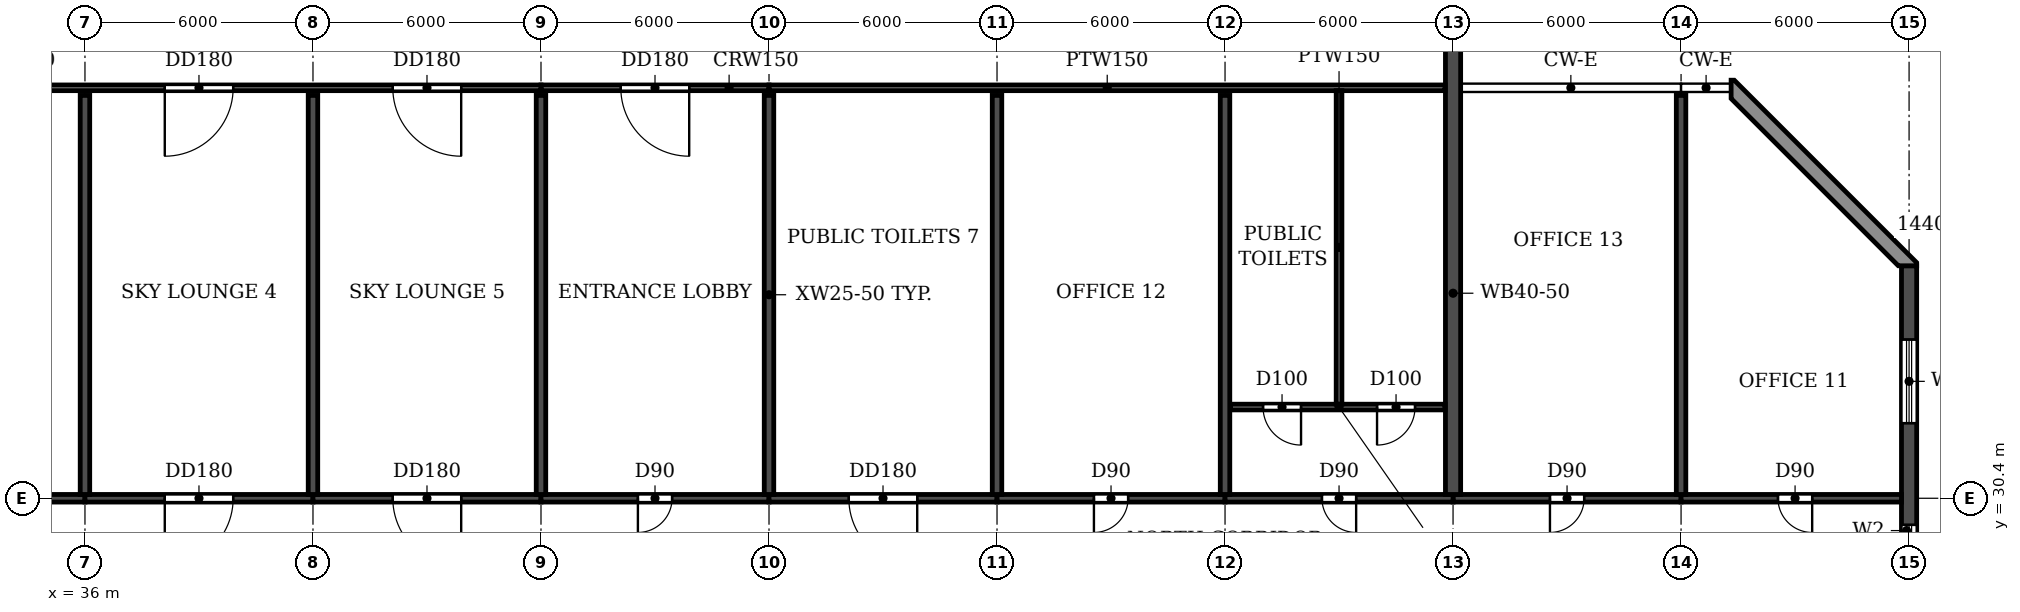
"""IFC4 building model, lengths in metres.
Left out: names, types, materials, properties, quantities, classifications, styles, units other than length and angle.
Written with IfcOpenShell. Run it as: python <this file> out.ifc"""

import sys

from ifc_helpers import new_model, si_unit, direction, frame, frame_2d, origin, place, context, subcontext, project, spatial, polyline, rectangle, outline, extrude, element, fill, save


model = new_model("IFC4")
c1 = context("Model", 3, precision=1e-05, world=origin(), true_north=direction((0.0, 1.0)))
c2 = subcontext(c1, "Body", "Model", "MODEL_VIEW")
j1 = project(units=[si_unit("LENGTHUNIT", "METRE"), si_unit("PLANEANGLEUNIT", "RADIAN")], contexts=[c1])
p1 = place(None, origin())
s1 = spatial("IfcSite", under=j1, at=p1, CompositionType="ELEMENT")
p2 = place(p1, origin())
s2 = spatial("IfcBuilding", under=s1, at=p2, CompositionType="ELEMENT")
p3 = place(p2, frame((0.0, 0.0, 261.0)))
s3 = spatial("IfcBuildingStorey", under=s2, at=p3, CompositionType="ELEMENT", Elevation=261.0)
for number, where, z_axis, x_axis in (
    (1, (36.0, 30.5, 0.0), (0.0, 0.0, 1.0), (0.0, 1.0, 0.0)),
    (2, (42.0, 30.5, 0.0), (0.0, 0.0, 1.0), (0.0, 1.0, 0.0)),
    (3, (48.0, 30.5, 0.0), (0.0, 0.0, 1.0), (0.0, 1.0, 0.0)),
    (4, (54.0, 30.5, 0.0), (0.0, 0.0, 1.0), (0.0, 1.0, 0.0)),
    (5, (60.0, 30.5, 0.0), (0.0, 0.0, 1.0), (0.0, 1.0, 0.0)),
    (6, (66.0, 30.5, 0.0), (0.0, 0.0, 1.0), (0.0, 1.0, 0.0)),
    (7, (78.0, 30.5, 0.0), (0.0, 0.0, 1.0), (0.0, 1.0, 0.0)),
):
    element("IfcWall", number, at=place(p3, frame(where, z_axis=z_axis, x_axis=x_axis)), inside=s3, PredefinedType="SHEAR", context=c2, shape_type="SweptSolid", body=[
        extrude(rectangle(XDim=10.5, YDim=0.25, at=frame_2d((5.25, 0.0))), origin(), (0.0, 0.0, 1.0), 5.7),
    ])
p4 = place(p3, frame((84.0, 4.683, 0.0), z_axis=(0.0, 0.0, 1.0), x_axis=(0.0, 1.0, 0.0)))
e8 = element("IfcWall", 8, at=p4, inside=s3, PredefinedType="SHEAR", context=c2, shape_type="SweptSolid", body=[
    extrude(rectangle(XDim=31.834, YDim=0.4, at=frame_2d((15.917, 0.0))), origin(), (0.0, 0.0, 1.0), 5.7),
])
p5 = place(p4, frame((23.817, 0.0, 0.9)))
e9 = element("IfcOpeningElement", 9, at=p5, cuts=e8, PredefinedType="OPENING", context=c2, shape_type="SweptSolid", body=[
    extrude(rectangle(XDim=1.2, YDim=1.5, at=frame_2d((0.6, 0.75))), frame((0.0, 0.21, 0.0), z_axis=(0.0, -1.0, 0.0), x_axis=(1.0, 0.0, 0.0)), (0.0, 0.0, 1.0), 0.42),
])
p6 = place(p4, frame((8.017, 0.0, 0.9)))
e10 = element("IfcOpeningElement", 10, at=p6, cuts=e8, PredefinedType="OPENING", context=c2, shape_type="SweptSolid", body=[
    extrude(rectangle(XDim=1.2, YDim=1.5, at=frame_2d((0.6, 0.75))), frame((0.0, 0.21, 0.0), z_axis=(0.0, -1.0, 0.0), x_axis=(1.0, 0.0, 0.0)), (0.0, 0.0, 1.0), 0.42),
])
p7 = place(p4, frame((27.694, 0.0, 0.6)))
e11 = element("IfcOpeningElement", 11, at=p7, cuts=e8, PredefinedType="OPENING", context=c2, shape_type="SweptSolid", body=[
    extrude(rectangle(XDim=2.2, YDim=1.8, at=frame_2d((1.1, 0.9))), frame((0.0, 0.21, 0.0), z_axis=(0.0, -1.0, 0.0), x_axis=(1.0, 0.0, 0.0)), (0.0, 0.0, 1.0), 0.42),
])
p8 = place(p4, frame((2.541, 0.0, 0.6)))
e12 = element("IfcOpeningElement", 12, at=p8, cuts=e8, PredefinedType="OPENING", context=c2, shape_type="SweptSolid", body=[
    extrude(rectangle(XDim=2.2, YDim=1.8, at=frame_2d((1.1, 0.9))), frame((0.0, 0.21, 0.0), z_axis=(0.0, -1.0, 0.0), x_axis=(1.0, 0.0, 0.0)), (0.0, 0.0, 1.0), 0.42),
])
p9 = place(p4, frame((15.917, 0.0, 0.9)))
e13 = element("IfcOpeningElement", 13, at=p9, cuts=e8, PredefinedType="OPENING", context=c2, shape_type="SweptSolid", body=[
    extrude(rectangle(XDim=1.2, YDim=1.5, at=frame_2d((0.6, 0.75))), frame((0.0, 0.21, 0.0), z_axis=(0.0, -1.0, 0.0), x_axis=(1.0, 0.0, 0.0)), (0.0, 0.0, 1.0), 0.42),
])
p10 = place(p3, frame((30.0, 30.4, 0.0), z_axis=(0.0, 0.0, 1.0), x_axis=(1.0, 0.0, 0.0)))
e14 = element("IfcWall", 14, at=p10, inside=s3, PredefinedType="SHEAR", context=c2, shape_type="SweptSolid", body=[
    extrude(rectangle(XDim=6.0, YDim=0.2, at=frame_2d((3.0, 0.0))), origin(), (0.0, 0.0, 1.0), 5.1),
])
p11 = place(p10, frame((2.55, 0.0, 0.0)))
e15 = element("IfcOpeningElement", 15, at=p11, cuts=e14, PredefinedType="OPENING", context=c2, shape_type="SweptSolid", body=[
    extrude(rectangle(XDim=0.9, YDim=2.1, at=frame_2d((0.45, 1.05))), frame((0.0, 0.11, 0.0), z_axis=(0.0, -1.0, 0.0), x_axis=(1.0, 0.0, 0.0)), (0.0, 0.0, 1.0), 0.22),
])
p12 = place(p3, frame((36.0, 30.4, 0.0), z_axis=(0.0, 0.0, 1.0), x_axis=(1.0, 0.0, 0.0)))
e16 = element("IfcWall", 16, at=p12, inside=s3, PredefinedType="SHEAR", context=c2, shape_type="SweptSolid", body=[
    extrude(rectangle(XDim=6.0, YDim=0.2, at=frame_2d((3.0, 0.0))), origin(), (0.0, 0.0, 1.0), 5.1),
])
p13 = place(p12, frame((2.1, 0.0, 0.0)))
e17 = element("IfcOpeningElement", 17, at=p13, cuts=e16, PredefinedType="OPENING", context=c2, shape_type="SweptSolid", body=[
    extrude(rectangle(XDim=1.8, YDim=2.1, at=frame_2d((0.9, 1.05))), frame((0.0, 0.11, 0.0), z_axis=(0.0, -1.0, 0.0), x_axis=(1.0, 0.0, 0.0)), (0.0, 0.0, 1.0), 0.22),
])
p14 = place(p3, frame((42.0, 30.4, 0.0), z_axis=(0.0, 0.0, 1.0), x_axis=(1.0, 0.0, 0.0)))
e18 = element("IfcWall", 18, at=p14, inside=s3, PredefinedType="SHEAR", context=c2, shape_type="SweptSolid", body=[
    extrude(rectangle(XDim=6.0, YDim=0.2, at=frame_2d((3.0, 0.0))), origin(), (0.0, 0.0, 1.0), 5.1),
])
p15 = place(p14, frame((2.1, 0.0, 0.0)))
e19 = element("IfcOpeningElement", 19, at=p15, cuts=e18, PredefinedType="OPENING", context=c2, shape_type="SweptSolid", body=[
    extrude(rectangle(XDim=1.8, YDim=2.1, at=frame_2d((0.9, 1.05))), frame((0.0, 0.11, 0.0), z_axis=(0.0, -1.0, 0.0), x_axis=(1.0, 0.0, 0.0)), (0.0, 0.0, 1.0), 0.22),
])
p16 = place(p3, frame((48.0, 30.4, 0.0), z_axis=(0.0, 0.0, 1.0), x_axis=(1.0, 0.0, 0.0)))
e20 = element("IfcWall", 20, at=p16, inside=s3, PredefinedType="SHEAR", context=c2, shape_type="SweptSolid", body=[
    extrude(rectangle(XDim=6.0, YDim=0.2, at=frame_2d((3.0, 0.0))), origin(), (0.0, 0.0, 1.0), 5.1),
])
p17 = place(p16, frame((2.55, 0.0, 0.0)))
e21 = element("IfcOpeningElement", 21, at=p17, cuts=e20, PredefinedType="OPENING", context=c2, shape_type="SweptSolid", body=[
    extrude(rectangle(XDim=0.9, YDim=2.1, at=frame_2d((0.45, 1.05))), frame((0.0, 0.11, 0.0), z_axis=(0.0, -1.0, 0.0), x_axis=(1.0, 0.0, 0.0)), (0.0, 0.0, 1.0), 0.22),
])
p18 = place(p3, frame((54.0, 30.4, 0.0), z_axis=(0.0, 0.0, 1.0), x_axis=(1.0, 0.0, 0.0)))
e22 = element("IfcWall", 22, at=p18, inside=s3, PredefinedType="SHEAR", context=c2, shape_type="SweptSolid", body=[
    extrude(rectangle(XDim=6.0, YDim=0.2, at=frame_2d((3.0, 0.0))), origin(), (0.0, 0.0, 1.0), 5.1),
])
p19 = place(p18, frame((2.1, 0.0, 0.0)))
e23 = element("IfcOpeningElement", 23, at=p19, cuts=e22, PredefinedType="OPENING", context=c2, shape_type="SweptSolid", body=[
    extrude(rectangle(XDim=1.8, YDim=2.1, at=frame_2d((0.9, 1.05))), frame((0.0, 0.11, 0.0), z_axis=(0.0, -1.0, 0.0), x_axis=(1.0, 0.0, 0.0)), (0.0, 0.0, 1.0), 0.22),
])
p20 = place(p3, frame((60.0, 30.4, 0.0), z_axis=(0.0, 0.0, 1.0), x_axis=(1.0, 0.0, 0.0)))
e24 = element("IfcWall", 24, at=p20, inside=s3, PredefinedType="SHEAR", context=c2, shape_type="SweptSolid", body=[
    extrude(rectangle(XDim=6.0, YDim=0.2, at=frame_2d((3.0, 0.0))), origin(), (0.0, 0.0, 1.0), 5.1),
])
p21 = place(p20, frame((2.55, 0.0, 0.0)))
e25 = element("IfcOpeningElement", 25, at=p21, cuts=e24, PredefinedType="OPENING", context=c2, shape_type="SweptSolid", body=[
    extrude(rectangle(XDim=0.9, YDim=2.1, at=frame_2d((0.45, 1.05))), frame((0.0, 0.11, 0.0), z_axis=(0.0, -1.0, 0.0), x_axis=(1.0, 0.0, 0.0)), (0.0, 0.0, 1.0), 0.22),
])
p22 = place(p3, frame((66.0, 30.4, 0.0), z_axis=(0.0, 0.0, 1.0), x_axis=(1.0, 0.0, 0.0)))
e26 = element("IfcWall", 26, at=p22, inside=s3, PredefinedType="SHEAR", context=c2, shape_type="SweptSolid", body=[
    extrude(rectangle(XDim=6.0, YDim=0.2, at=frame_2d((3.0, 0.0))), origin(), (0.0, 0.0, 1.0), 5.1),
])
p23 = place(p22, frame((2.55, 0.0, 0.0)))
e27 = element("IfcOpeningElement", 27, at=p23, cuts=e26, PredefinedType="OPENING", context=c2, shape_type="SweptSolid", body=[
    extrude(rectangle(XDim=0.9, YDim=2.1, at=frame_2d((0.45, 1.05))), frame((0.0, 0.11, 0.0), z_axis=(0.0, -1.0, 0.0), x_axis=(1.0, 0.0, 0.0)), (0.0, 0.0, 1.0), 0.22),
])
p24 = place(p3, frame((72.0, 30.4, 0.0), z_axis=(0.0, 0.0, 1.0), x_axis=(1.0, 0.0, 0.0)))
e28 = element("IfcWall", 28, at=p24, inside=s3, PredefinedType="SHEAR", context=c2, shape_type="SweptSolid", body=[
    extrude(rectangle(XDim=6.0, YDim=0.2, at=frame_2d((3.0, 0.0))), origin(), (0.0, 0.0, 1.0), 5.1),
])
p25 = place(p24, frame((2.55, 0.0, 0.0)))
e29 = element("IfcOpeningElement", 29, at=p25, cuts=e28, PredefinedType="OPENING", context=c2, shape_type="SweptSolid", body=[
    extrude(rectangle(XDim=0.9, YDim=2.1, at=frame_2d((0.45, 1.05))), frame((0.0, 0.11, 0.0), z_axis=(0.0, -1.0, 0.0), x_axis=(1.0, 0.0, 0.0)), (0.0, 0.0, 1.0), 0.22),
])
p26 = place(p3, frame((78.0, 30.4, 0.0), z_axis=(0.0, 0.0, 1.0), x_axis=(1.0, 0.0, 0.0)))
e30 = element("IfcWall", 30, at=p26, inside=s3, PredefinedType="SHEAR", context=c2, shape_type="SweptSolid", body=[
    extrude(rectangle(XDim=5.8, YDim=0.2, at=frame_2d((2.9, 0.0))), origin(), (0.0, 0.0, 1.0), 5.1),
])
p27 = place(p26, frame((2.55, 0.0, 0.0)))
e31 = element("IfcOpeningElement", 31, at=p27, cuts=e30, PredefinedType="OPENING", context=c2, shape_type="SweptSolid", body=[
    extrude(rectangle(XDim=0.9, YDim=2.1, at=frame_2d((0.45, 1.05))), frame((0.0, 0.11, 0.0), z_axis=(0.0, -1.0, 0.0), x_axis=(1.0, 0.0, 0.0)), (0.0, 0.0, 1.0), 0.22),
])
p28 = place(p3, frame((72.0, 30.5, -1.2), z_axis=(0.0, 0.0, 1.0), x_axis=(0.0, 1.0, 0.0)))
e32 = element("IfcWall", 32, at=p28, inside=s3, PredefinedType="SHEAR", context=c2, shape_type="SweptSolid", body=[
    extrude(rectangle(XDim=21.1, YDim=0.4, at=frame_2d((10.55, 0.0))), origin(), (0.0, 0.0, 1.0), 6.9),
])
p29 = place(p3, origin())
e33 = element("IfcWall", 33, at=p29, inside=s3, PredefinedType="STANDARD", context=c2, shape_type="SweptSolid", body=[
    extrude(outline(polyline([(84.2, 36.517), (84.2, 36.6), (79.4, 41.4), (79.317, 41.4), (79.317, 40.917), (83.717, 36.517), (84.2, 36.517)])), origin(), (0.0, 0.0, 1.0), 5.7),
])
p30 = place(p3, frame((66.135, 32.8, 0.0), z_axis=(0.0, 0.0, 1.0), x_axis=(1.0, 0.0, 0.0)))
e34 = element("IfcWall", 34, at=p30, inside=s3, PredefinedType="PARTITIONING", context=c2, shape_type="SweptSolid", body=[
    extrude(rectangle(XDim=5.655, YDim=0.15, at=frame_2d((2.828, 0.0))), origin(), (0.0, 0.0, 1.0), 5.7),
])
p31 = place(p30, frame((0.865, 0.0, 0.0)))
e35 = element("IfcOpeningElement", 35, at=p31, cuts=e34, PredefinedType="OPENING", context=c2, shape_type="SweptSolid", body=[
    extrude(rectangle(XDim=1.0, YDim=2.1, at=frame_2d((0.5, 1.05))), frame((0.0, 0.085, 0.0), z_axis=(0.0, -1.0, 0.0), x_axis=(1.0, 0.0, 0.0)), (0.0, 0.0, 1.0), 0.17),
])
p32 = place(p30, frame((3.865, 0.0, 0.0)))
e36 = element("IfcOpeningElement", 36, at=p32, cuts=e34, PredefinedType="OPENING", context=c2, shape_type="SweptSolid", body=[
    extrude(rectangle(XDim=1.0, YDim=2.1, at=frame_2d((0.5, 1.05))), frame((0.0, 0.085, 0.0), z_axis=(0.0, -1.0, 0.0), x_axis=(1.0, 0.0, 0.0)), (0.0, 0.0, 1.0), 0.17),
])
p33 = place(p3, frame((48.0, 41.2, 0.0), z_axis=(0.0, 0.0, 1.0), x_axis=(1.0, 0.0, 0.0)))
e37 = element("IfcWall", 37, at=p33, inside=s3, PredefinedType="PARTITIONING", context=c2, shape_type="SweptSolid", body=[
    extrude(rectangle(XDim=6.0, YDim=0.15, at=frame_2d((3.0, 0.0))), origin(), (0.0, 0.0, 1.0), 5.7),
])
p34 = place(p33, frame((2.1, 0.0, 0.0)))
e38 = element("IfcOpeningElement", 38, at=p34, cuts=e37, PredefinedType="OPENING", context=c2, shape_type="SweptSolid", body=[
    extrude(rectangle(XDim=1.8, YDim=2.1, at=frame_2d((0.9, 1.05))), frame((0.0, 0.085, 0.0), z_axis=(0.0, -1.0, 0.0), x_axis=(1.0, 0.0, 0.0)), (0.0, 0.0, 1.0), 0.17),
])
p35 = place(p3, frame((30.21, 41.2, 0.0), z_axis=(0.0, 0.0, 1.0), x_axis=(1.0, 0.0, 0.0)))
e39 = element("IfcWall", 39, at=p35, inside=s3, PredefinedType="PARTITIONING", context=c2, shape_type="SweptSolid", body=[
    extrude(rectangle(XDim=17.79, YDim=0.15, at=frame_2d((8.895, 0.0))), origin(), (0.0, 0.0, 1.0), 5.7),
])
p36 = place(p35, frame((7.89, 0.0, 0.0)))
e40 = element("IfcOpeningElement", 40, at=p36, cuts=e39, PredefinedType="OPENING", context=c2, shape_type="SweptSolid", body=[
    extrude(rectangle(XDim=1.8, YDim=2.1, at=frame_2d((0.9, 1.05))), frame((0.0, 0.085, 0.0), z_axis=(0.0, -1.0, 0.0), x_axis=(1.0, 0.0, 0.0)), (0.0, 0.0, 1.0), 0.17),
])
p37 = place(p35, frame((13.89, 0.0, 0.0)))
e41 = element("IfcOpeningElement", 41, at=p37, cuts=e39, PredefinedType="OPENING", context=c2, shape_type="SweptSolid", body=[
    extrude(rectangle(XDim=1.8, YDim=2.1, at=frame_2d((0.9, 1.05))), frame((0.0, 0.085, 0.0), z_axis=(0.0, -1.0, 0.0), x_axis=(1.0, 0.0, 0.0)), (0.0, 0.0, 1.0), 0.17),
])
p38 = place(p3, frame((54.0, 41.2, 0.0), z_axis=(0.0, 0.0, 1.0), x_axis=(1.0, 0.0, 0.0)))
e42 = element("IfcWall", 42, at=p38, inside=s3, PredefinedType="PARTITIONING", context=c2, shape_type="SweptSolid", body=[
    extrude(rectangle(XDim=17.79, YDim=0.15, at=frame_2d((8.895, 0.0))), origin(), (0.0, 0.0, 1.0), 5.7),
])
p39 = place(p3, frame((69.0, 32.875, 0.0), z_axis=(0.0, 0.0, 1.0), x_axis=(0.0, 1.0, 0.0)))
e43 = element("IfcWall", 43, at=p39, inside=s3, PredefinedType="PARTITIONING", context=c2, shape_type="SweptSolid", body=[
    extrude(rectangle(XDim=8.25, YDim=0.15, at=frame_2d((4.125, 0.0))), origin(), (0.0, 0.0, 1.0), 5.7),
])
p40 = place(p5, origin())
e44 = element("IfcWindow", 44, at=p40, inside=s3, PartitioningType="SINGLE_PANEL", PredefinedType="WINDOW", context=c2, shape_type="SweptSolid", body=[
    extrude(rectangle(XDim=1.2, YDim=1.5, at=frame_2d((0.6, 0.75))), frame((0.0, 0.03, 0.0), z_axis=(0.0, -1.0, 0.0), x_axis=(1.0, 0.0, 0.0)), (0.0, 0.0, 1.0), 0.06),
])
fill(e9, e44)
p41 = place(p7, origin())
e45 = element("IfcWindow", 45, at=p41, inside=s3, PartitioningType="DOUBLE_PANEL_HORIZONTAL", PredefinedType="WINDOW", context=c2, shape_type="SweptSolid", body=[
    extrude(rectangle(XDim=2.2, YDim=1.8, at=frame_2d((1.1, 0.9))), frame((0.0, 0.03, 0.0), z_axis=(0.0, -1.0, 0.0), x_axis=(1.0, 0.0, 0.0)), (0.0, 0.0, 1.0), 0.06),
])
fill(e11, e45)
p42 = place(p13, frame((1.8, 0.0, 0.0), z_axis=(0.0, 0.0, 1.0), x_axis=(-1.0, 0.0, 0.0)))
e46 = element("IfcDoor", 46, at=p42, inside=s3, OperationType="DOUBLE_DOOR_SINGLE_SWING", PredefinedType="DOOR", context=c2, shape_type="SweptSolid", body=[
    extrude(rectangle(XDim=1.8, YDim=2.1, at=frame_2d((0.9, 1.05))), frame((0.0, 0.025, 0.0), z_axis=(0.0, -1.0, 0.0), x_axis=(1.0, 0.0, 0.0)), (0.0, 0.0, 1.0), 0.05),
])
fill(e17, e46)
p43 = place(p15, frame((1.8, 0.0, 0.0), z_axis=(0.0, 0.0, 1.0), x_axis=(-1.0, 0.0, 0.0)))
e47 = element("IfcDoor", 47, at=p43, inside=s3, OperationType="DOUBLE_DOOR_SINGLE_SWING", PredefinedType="DOOR", context=c2, shape_type="SweptSolid", body=[
    extrude(rectangle(XDim=1.8, YDim=2.1, at=frame_2d((0.9, 1.05))), frame((0.0, 0.025, 0.0), z_axis=(0.0, -1.0, 0.0), x_axis=(1.0, 0.0, 0.0)), (0.0, 0.0, 1.0), 0.05),
])
fill(e19, e47)
p44 = place(p17, frame((0.9, 0.0, 0.0), z_axis=(0.0, 0.0, 1.0), x_axis=(-1.0, 0.0, 0.0)))
e48 = element("IfcDoor", 48, at=p44, inside=s3, OperationType="SINGLE_SWING_RIGHT", PredefinedType="DOOR", context=c2, shape_type="SweptSolid", body=[
    extrude(rectangle(XDim=0.9, YDim=2.1, at=frame_2d((0.45, 1.05))), frame((0.0, 0.025, 0.0), z_axis=(0.0, -1.0, 0.0), x_axis=(1.0, 0.0, 0.0)), (0.0, 0.0, 1.0), 0.05),
])
fill(e21, e48)
p45 = place(p19, frame((1.8, 0.0, 0.0), z_axis=(0.0, 0.0, 1.0), x_axis=(-1.0, 0.0, 0.0)))
e49 = element("IfcDoor", 49, at=p45, inside=s3, OperationType="DOUBLE_DOOR_SINGLE_SWING", PredefinedType="DOOR", context=c2, shape_type="SweptSolid", body=[
    extrude(rectangle(XDim=1.8, YDim=2.1, at=frame_2d((0.9, 1.05))), frame((0.0, 0.025, 0.0), z_axis=(0.0, -1.0, 0.0), x_axis=(1.0, 0.0, 0.0)), (0.0, 0.0, 1.0), 0.05),
])
fill(e23, e49)
p46 = place(p21, frame((0.9, 0.0, 0.0), z_axis=(0.0, 0.0, 1.0), x_axis=(-1.0, 0.0, 0.0)))
e50 = element("IfcDoor", 50, at=p46, inside=s3, OperationType="SINGLE_SWING_RIGHT", PredefinedType="DOOR", context=c2, shape_type="SweptSolid", body=[
    extrude(rectangle(XDim=0.9, YDim=2.1, at=frame_2d((0.45, 1.05))), frame((0.0, 0.025, 0.0), z_axis=(0.0, -1.0, 0.0), x_axis=(1.0, 0.0, 0.0)), (0.0, 0.0, 1.0), 0.05),
])
fill(e25, e50)
p47 = place(p23, frame((0.9, 0.0, 0.0), z_axis=(0.0, 0.0, 1.0), x_axis=(-1.0, 0.0, 0.0)))
e51 = element("IfcDoor", 51, at=p47, inside=s3, OperationType="SINGLE_SWING_LEFT", PredefinedType="DOOR", context=c2, shape_type="SweptSolid", body=[
    extrude(rectangle(XDim=0.9, YDim=2.1, at=frame_2d((0.45, 1.05))), frame((0.0, 0.025, 0.0), z_axis=(0.0, -1.0, 0.0), x_axis=(1.0, 0.0, 0.0)), (0.0, 0.0, 1.0), 0.05),
])
fill(e27, e51)
p48 = place(p25, frame((0.9, 0.0, 0.0), z_axis=(0.0, 0.0, 1.0), x_axis=(-1.0, 0.0, 0.0)))
e52 = element("IfcDoor", 52, at=p48, inside=s3, OperationType="SINGLE_SWING_RIGHT", PredefinedType="DOOR", context=c2, shape_type="SweptSolid", body=[
    extrude(rectangle(XDim=0.9, YDim=2.1, at=frame_2d((0.45, 1.05))), frame((0.0, 0.025, 0.0), z_axis=(0.0, -1.0, 0.0), x_axis=(1.0, 0.0, 0.0)), (0.0, 0.0, 1.0), 0.05),
])
fill(e29, e52)
p49 = place(p27, frame((0.9, 0.0, 0.0), z_axis=(0.0, 0.0, 1.0), x_axis=(-1.0, 0.0, 0.0)))
e53 = element("IfcDoor", 53, at=p49, inside=s3, OperationType="SINGLE_SWING_LEFT", PredefinedType="DOOR", context=c2, shape_type="SweptSolid", body=[
    extrude(rectangle(XDim=0.9, YDim=2.1, at=frame_2d((0.45, 1.05))), frame((0.0, 0.025, 0.0), z_axis=(0.0, -1.0, 0.0), x_axis=(1.0, 0.0, 0.0)), (0.0, 0.0, 1.0), 0.05),
])
fill(e31, e53)
p50 = place(p36, frame((1.8, 0.0, 0.0), z_axis=(0.0, 0.0, 1.0), x_axis=(-1.0, 0.0, 0.0)))
e54 = element("IfcDoor", 54, at=p50, inside=s3, OperationType="DOUBLE_DOOR_SINGLE_SWING", PredefinedType="DOOR", context=c2, shape_type="SweptSolid", body=[
    extrude(rectangle(XDim=1.8, YDim=2.1, at=frame_2d((0.9, 1.05))), frame((0.0, 0.025, 0.0), z_axis=(0.0, -1.0, 0.0), x_axis=(1.0, 0.0, 0.0)), (0.0, 0.0, 1.0), 0.05),
])
fill(e40, e54)
p51 = place(p37, frame((1.8, 0.0, 0.0), z_axis=(0.0, 0.0, 1.0), x_axis=(-1.0, 0.0, 0.0)))
e55 = element("IfcDoor", 55, at=p51, inside=s3, OperationType="DOUBLE_DOOR_SINGLE_SWING", PredefinedType="DOOR", context=c2, shape_type="SweptSolid", body=[
    extrude(rectangle(XDim=1.8, YDim=2.1, at=frame_2d((0.9, 1.05))), frame((0.0, 0.025, 0.0), z_axis=(0.0, -1.0, 0.0), x_axis=(1.0, 0.0, 0.0)), (0.0, 0.0, 1.0), 0.05),
])
fill(e41, e55)
p52 = place(p34, frame((1.8, 0.0, 0.0), z_axis=(0.0, 0.0, 1.0), x_axis=(-1.0, 0.0, 0.0)))
e56 = element("IfcDoor", 56, at=p52, inside=s3, OperationType="DOUBLE_DOOR_SINGLE_SWING", PredefinedType="DOOR", context=c2, shape_type="SweptSolid", body=[
    extrude(rectangle(XDim=1.8, YDim=2.1, at=frame_2d((0.9, 1.05))), frame((0.0, 0.025, 0.0), z_axis=(0.0, -1.0, 0.0), x_axis=(1.0, 0.0, 0.0)), (0.0, 0.0, 1.0), 0.05),
])
fill(e38, e56)
p53 = place(p31, frame((1.0, 0.0, 0.0), z_axis=(0.0, 0.0, 1.0), x_axis=(-1.0, 0.0, 0.0)))
e57 = element("IfcDoor", 57, at=p53, inside=s3, OperationType="SINGLE_SWING_LEFT", PredefinedType="DOOR", context=c2, shape_type="SweptSolid", body=[
    extrude(rectangle(XDim=1.0, YDim=2.1, at=frame_2d((0.5, 1.05))), frame((0.0, 0.025, 0.0), z_axis=(0.0, -1.0, 0.0), x_axis=(1.0, 0.0, 0.0)), (0.0, 0.0, 1.0), 0.05),
])
fill(e35, e57)
p54 = place(p32, frame((1.0, 0.0, 0.0), z_axis=(0.0, 0.0, 1.0), x_axis=(-1.0, 0.0, 0.0)))
e58 = element("IfcDoor", 58, at=p54, inside=s3, OperationType="SINGLE_SWING_RIGHT", PredefinedType="DOOR", context=c2, shape_type="SweptSolid", body=[
    extrude(rectangle(XDim=1.0, YDim=2.1, at=frame_2d((0.5, 1.05))), frame((0.0, 0.025, 0.0), z_axis=(0.0, -1.0, 0.0), x_axis=(1.0, 0.0, 0.0)), (0.0, 0.0, 1.0), 0.05),
])
fill(e36, e58)
save(model, sys.argv[1])
